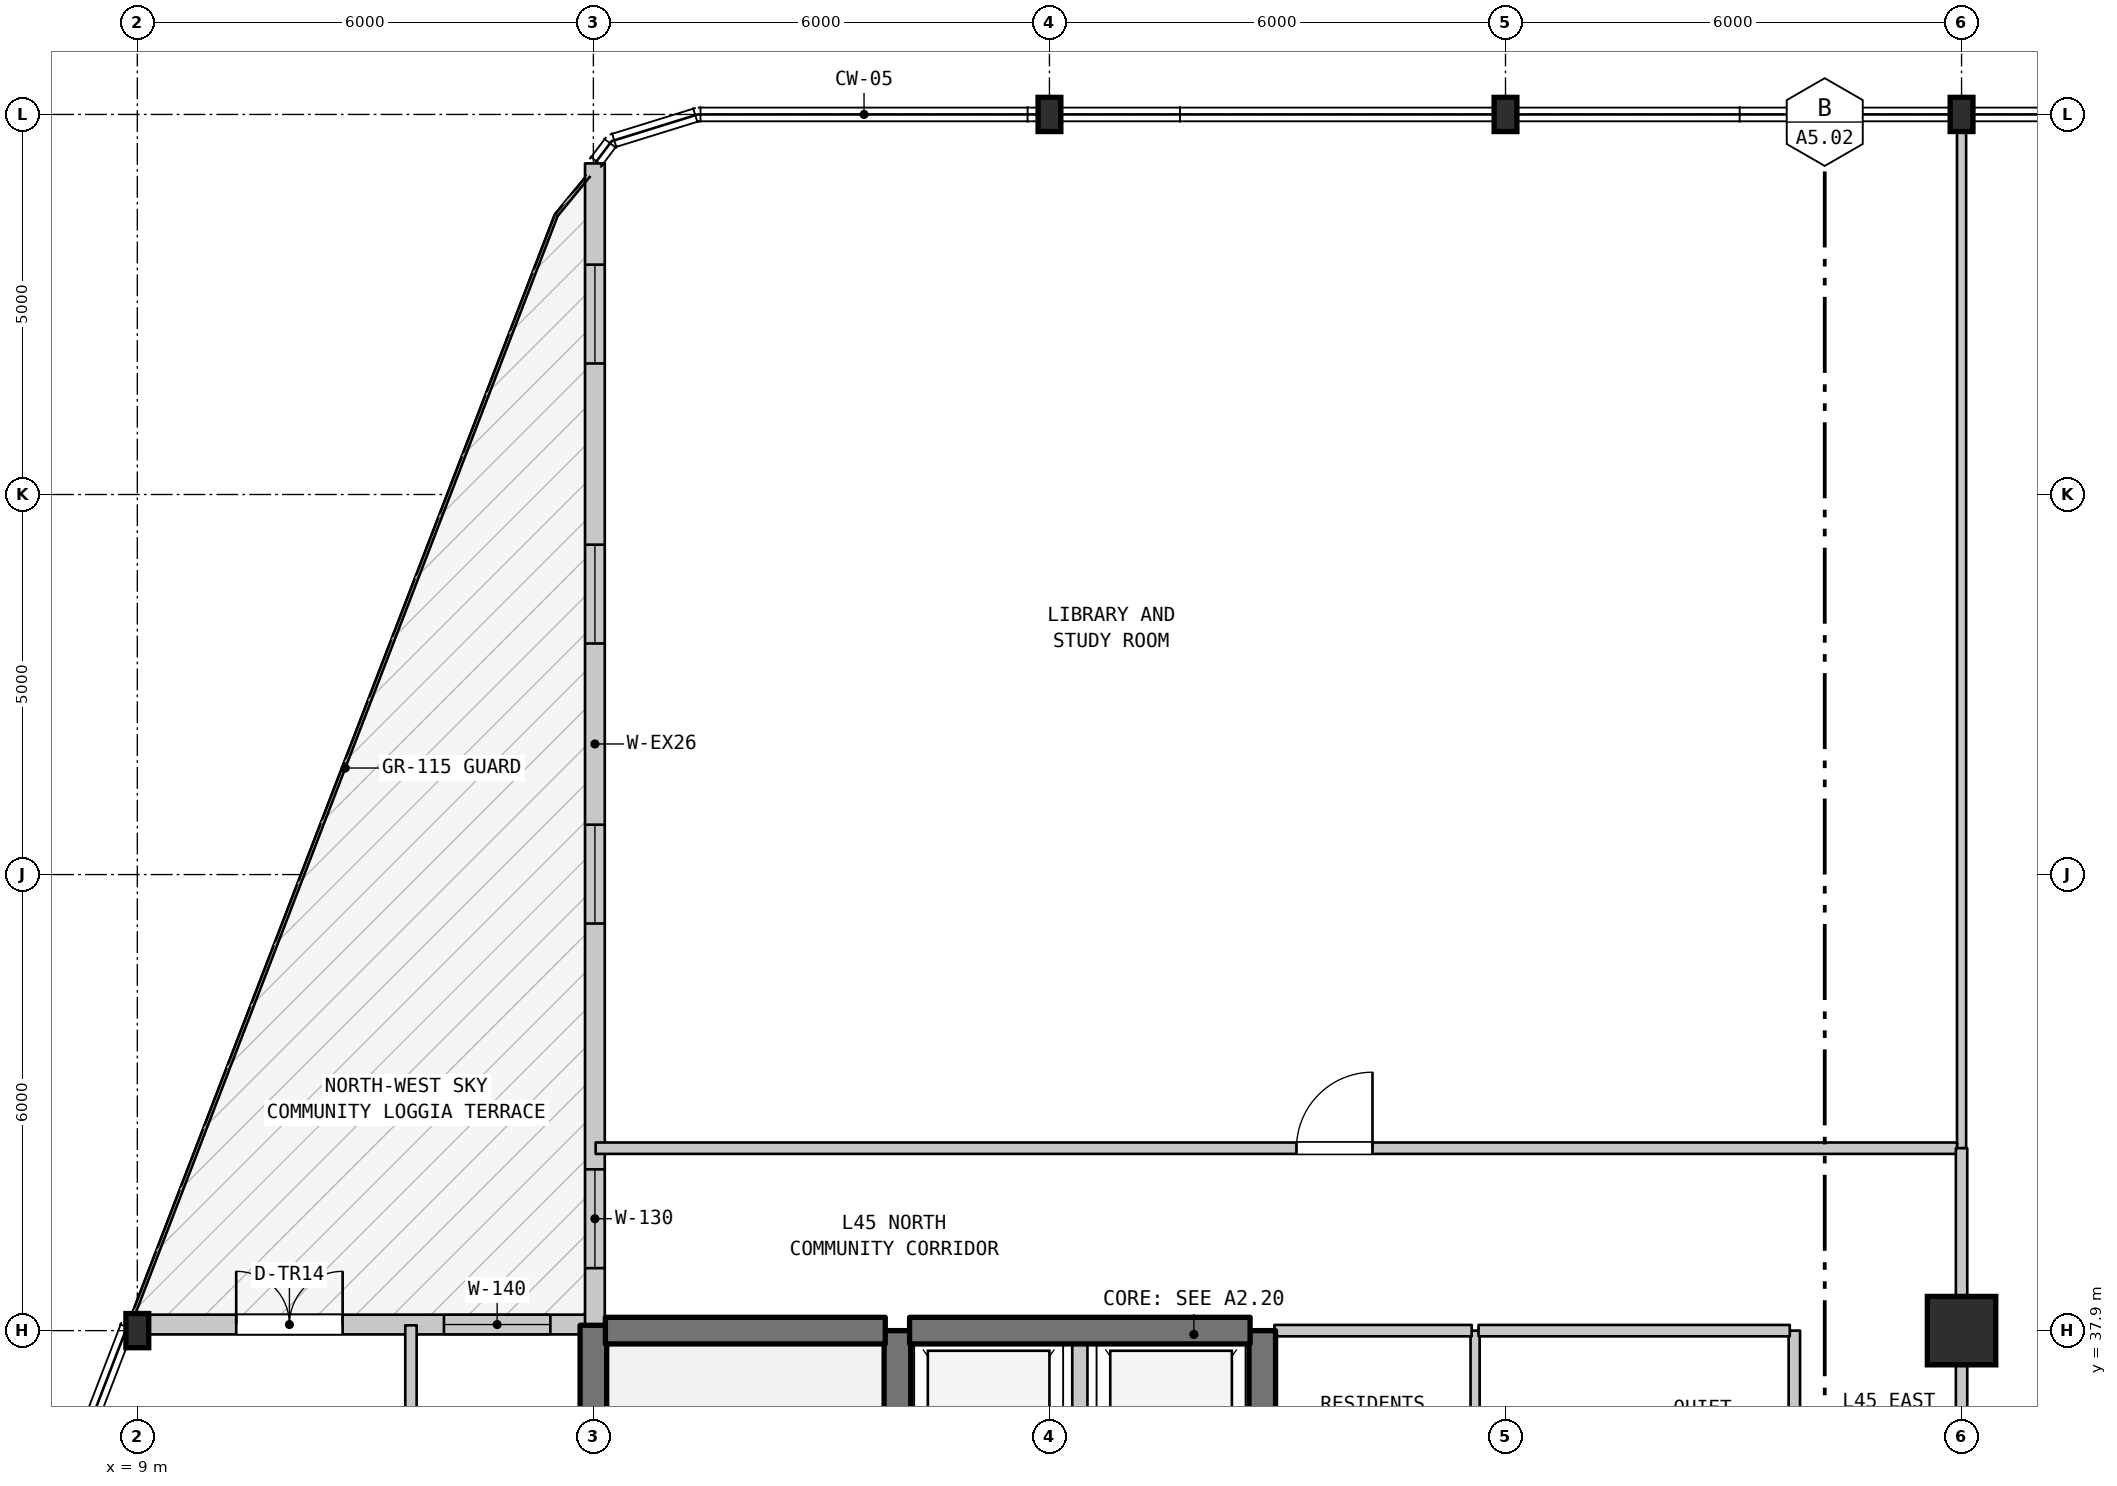
"""IFC4 building model, lengths in metres.
Left out: names, types, materials, properties, quantities, classifications, styles, units other than length and angle.
Written with IfcOpenShell. Run it as: python <this file> out.ifc"""

import sys

from ifc_helpers import new_model, si_unit, direction, frame, frame_2d, origin, origin_2d, place, context, subcontext, project, spatial, rectangle, i_section, extrude, element, fill, save


model = new_model("IFC4")
c1 = context("Model", 3, precision=1e-05, world=origin(), true_north=direction((0.0, 1.0)))
c2 = subcontext(c1, "Body", "Model", "MODEL_VIEW")
j1 = project(units=[si_unit("LENGTHUNIT", "METRE"), si_unit("PLANEANGLEUNIT", "RADIAN")], contexts=[c1])
p1 = place(None, origin())
s1 = spatial("IfcSite", under=j1, at=p1, CompositionType="ELEMENT")
p2 = place(p1, origin())
s2 = spatial("IfcBuilding", under=s1, at=p2, CompositionType="ELEMENT")
p3 = place(p2, frame((0.0, 0.0, 183.9)))
s3 = spatial("IfcBuildingStorey", under=s2, at=p3, CompositionType="ELEMENT", Elevation=183.9)
for number, where, z_axis, x_axis in (
    (1, (9.0, 37.9, 0.0), (0.0, 0.0, 1.0), (1.0, 0.0, 0.0)),
    (2, (21.0, 53.9, 0.0), (0.0, 0.0, 1.0), (1.0, 0.0, 0.0)),
    (3, (27.0, 53.9, 0.0), (0.0, 0.0, 1.0), (1.0, 0.0, 0.0)),
):
    element("IfcColumn", number, at=place(p3, frame(where, z_axis=z_axis, x_axis=x_axis)), inside=s3, PredefinedType="COLUMN", context=c2, shape_type="SweptSolid", body=[
        extrude(i_section(OverallWidth=0.3, OverallDepth=0.45, WebThickness=0.014, FlangeThickness=0.026, FilletRadius=0.027, at=origin_2d()), origin(), (0.0, 0.0, 1.0), 4.5),
    ])
p4 = place(p3, frame((33.0, 37.9, 0.0), z_axis=(0.0, 0.0, 1.0), x_axis=(1.0, 0.0, 0.0)))
e4 = element("IfcColumn", 4, at=p4, inside=s3, PredefinedType="COLUMN", context=c2, shape_type="SweptSolid", body=[
    extrude(rectangle(XDim=0.9, YDim=0.9, at=origin_2d()), origin(), (0.0, 0.0, 1.0), 4.5),
])
p5 = place(p3, frame((33.0, 53.9, 0.0), z_axis=(0.0, 0.0, 1.0), x_axis=(1.0, 0.0, 0.0)))
e5 = element("IfcColumn", 5, at=p5, inside=s3, PredefinedType="COLUMN", context=c2, shape_type="SweptSolid", body=[
    extrude(i_section(OverallWidth=0.3, OverallDepth=0.45, WebThickness=0.014, FlangeThickness=0.026, FilletRadius=0.027, at=origin_2d()), origin(), (0.0, 0.0, 1.0), 4.5),
])
p6 = place(p3, frame((8.877, 37.98, 0.0), z_axis=(0.0, 0.0, 1.0), x_axis=(1.0, 0.0, 0.0)))
e6 = element("IfcWall", 6, at=p6, inside=s3, PredefinedType="STANDARD", context=c2, shape_type="SweptSolid", body=[
    extrude(rectangle(XDim=6.143, YDim=0.26, at=frame_2d((3.072, 0.0))), origin(), (0.0, 0.0, 1.0), 3.89),
])
p7 = place(p6, frame((1.424, 0.0, 0.0)))
e7 = element("IfcOpeningElement", 7, at=p7, cuts=e6, PredefinedType="OPENING", context=c2, shape_type="SweptSolid", body=[
    extrude(rectangle(XDim=1.4, YDim=2.2, at=frame_2d((0.7, 1.1))), frame((0.0, 0.14, 0.0), z_axis=(0.0, -1.0, 0.0), x_axis=(1.0, 0.0, 0.0)), (0.0, 0.0, 1.0), 0.28),
])
p8 = place(p6, frame((4.157, 0.0, 0.9)))
e8 = element("IfcOpeningElement", 8, at=p8, cuts=e6, PredefinedType="OPENING", context=c2, shape_type="SweptSolid", body=[
    extrude(rectangle(XDim=1.4, YDim=1.85, at=frame_2d((0.7, 0.925))), frame((0.0, 0.14, 0.0), z_axis=(0.0, -1.0, 0.0), x_axis=(1.0, 0.0, 0.0)), (0.0, 0.0, 1.0), 0.28),
])
p9 = place(p3, frame((15.02, 37.98, 0.0), z_axis=(0.0, 0.0, 1.0), x_axis=(0.0, 1.0, 0.0)))
e9 = element("IfcWall", 9, at=p9, inside=s3, PredefinedType="STANDARD", context=c2, shape_type="SweptSolid", body=[
    extrude(rectangle(XDim=15.276, YDim=0.26, at=frame_2d((7.638, 0.0))), origin(), (0.0, 0.0, 1.0), 4.19),
])
p10 = place(p9, frame((0.742, 0.0, 0.85)))
e10 = element("IfcOpeningElement", 10, at=p10, cuts=e9, PredefinedType="OPENING", context=c2, shape_type="SweptSolid", body=[
    extrude(rectangle(XDim=1.3, YDim=1.9, at=frame_2d((0.65, 0.95))), frame((0.0, 0.14, 0.0), z_axis=(0.0, -1.0, 0.0), x_axis=(1.0, 0.0, 0.0)), (0.0, 0.0, 1.0), 0.28),
])
p11 = place(p9, frame((5.276, 0.0, 0.85)))
e11 = element("IfcOpeningElement", 11, at=p11, cuts=e9, PredefinedType="OPENING", context=c2, shape_type="SweptSolid", body=[
    extrude(rectangle(XDim=1.3, YDim=1.9, at=frame_2d((0.65, 0.95))), frame((0.0, 0.14, 0.0), z_axis=(0.0, -1.0, 0.0), x_axis=(1.0, 0.0, 0.0)), (0.0, 0.0, 1.0), 0.28),
])
p12 = place(p9, frame((8.96, 0.0, 0.85)))
e12 = element("IfcOpeningElement", 12, at=p12, cuts=e9, PredefinedType="OPENING", context=c2, shape_type="SweptSolid", body=[
    extrude(rectangle(XDim=1.3, YDim=1.9, at=frame_2d((0.65, 0.95))), frame((0.0, 0.14, 0.0), z_axis=(0.0, -1.0, 0.0), x_axis=(1.0, 0.0, 0.0)), (0.0, 0.0, 1.0), 0.28),
])
p13 = place(p9, frame((12.644, 0.0, 0.85)))
e13 = element("IfcOpeningElement", 13, at=p13, cuts=e9, PredefinedType="OPENING", context=c2, shape_type="SweptSolid", body=[
    extrude(rectangle(XDim=1.3, YDim=1.9, at=frame_2d((0.65, 0.95))), frame((0.0, 0.14, 0.0), z_axis=(0.0, -1.0, 0.0), x_axis=(1.0, 0.0, 0.0)), (0.0, 0.0, 1.0), 0.28),
])
p14 = place(p3, frame((12.6, 17.9, 0.0), z_axis=(0.0, 0.0, 1.0), x_axis=(0.0, 1.0, 0.0)))
e14 = element("IfcWall", 14, at=p14, inside=s3, PredefinedType="STANDARD", context=c2, shape_type="SweptSolid", body=[
    extrude(rectangle(XDim=20.07, YDim=0.15, at=frame_2d((10.035, 0.0))), origin(), (0.0, 0.0, 1.0), 4.19),
])
p15 = place(p14, frame((9.1, 0.0, 0.0)))
e15 = element("IfcOpeningElement", 15, at=p15, cuts=e14, PredefinedType="OPENING", context=c2, shape_type="SweptSolid", body=[
    extrude(rectangle(XDim=1.0, YDim=2.15, at=frame_2d((0.5, 1.075))), frame((0.0, 0.085, 0.0), z_axis=(0.0, -1.0, 0.0), x_axis=(1.0, 0.0, 0.0)), (0.0, 0.0, 1.0), 0.17),
])
p16 = place(p3, frame((15.0, 31.1, 0.0), z_axis=(0.0, 0.0, 1.0), x_axis=(0.0, 1.0, 0.0)))
e16 = element("IfcWall", 16, at=p16, inside=s3, PredefinedType="SHEAR", context=c2, shape_type="SweptSolid", body=[
    extrude(rectangle(XDim=6.87, YDim=0.35, at=frame_2d((3.435, 0.0))), origin(), (0.0, 0.0, 1.0), 4.19),
])
p17 = place(p3, frame((19.0, 35.0, 0.0), z_axis=(0.0, 0.0, 1.0), x_axis=(0.0, 1.0, 0.0)))
e17 = element("IfcWall", 17, at=p17, inside=s3, PredefinedType="SHEAR", context=c2, shape_type="SweptSolid", body=[
    extrude(rectangle(XDim=2.9, YDim=0.35, at=frame_2d((1.45, 0.0))), origin(), (0.0, 0.0, 1.0), 4.19),
])
p18 = place(p3, frame((21.4, 35.0, 0.0), z_axis=(0.0, 0.0, 1.0), x_axis=(0.0, 1.0, 0.0)))
e18 = element("IfcWall", 18, at=p18, inside=s3, PredefinedType="STANDARD", context=c2, shape_type="SweptSolid", body=[
    extrude(rectangle(XDim=2.9, YDim=0.2, at=frame_2d((1.45, 0.0))), origin(), (0.0, 0.0, 1.0), 4.19),
])
p19 = place(p3, frame((23.8, 35.0, 0.0), z_axis=(0.0, 0.0, 1.0), x_axis=(0.0, 1.0, 0.0)))
e19 = element("IfcWall", 19, at=p19, inside=s3, PredefinedType="SHEAR", context=c2, shape_type="SweptSolid", body=[
    extrude(rectangle(XDim=2.9, YDim=0.35, at=frame_2d((1.45, 0.0))), origin(), (0.0, 0.0, 1.0), 4.19),
])
p20 = place(p3, frame((26.6, 35.0, 0.0), z_axis=(0.0, 0.0, 1.0), x_axis=(0.0, 1.0, 0.0)))
e20 = element("IfcWall", 20, at=p20, inside=s3, PredefinedType="PARTITIONING", context=c2, shape_type="SweptSolid", body=[
    extrude(rectangle(XDim=2.9, YDim=0.12, at=frame_2d((1.45, 0.0))), origin(), (0.0, 0.0, 1.0), 4.19),
])
p21 = place(p3, frame((30.8, 35.0, 0.0), z_axis=(0.0, 0.0, 1.0), x_axis=(0.0, 1.0, 0.0)))
e21 = element("IfcWall", 21, at=p21, inside=s3, PredefinedType="STANDARD", context=c2, shape_type="SweptSolid", body=[
    extrude(rectangle(XDim=2.9, YDim=0.15, at=frame_2d((1.45, 0.0))), origin(), (0.0, 0.0, 1.0), 4.19),
])
p22 = place(p3, frame((33.0, 27.9, 0.0), z_axis=(0.0, 0.0, 1.0), x_axis=(0.0, 1.0, 0.0)))
e22 = element("IfcWall", 22, at=p22, inside=s3, PredefinedType="STANDARD", context=c2, shape_type="SweptSolid", body=[
    extrude(rectangle(XDim=10.0, YDim=0.15, at=frame_2d((5.0, 0.0))), origin(), (0.0, 0.0, 1.0), 3.69),
])
p23 = place(p3, frame((33.0, 40.3, 0.0), z_axis=(0.0, 0.0, 1.0), x_axis=(0.0, 1.0, 0.0)))
e23 = element("IfcWall", 23, at=p23, inside=s3, PredefinedType="PARTITIONING", context=c2, shape_type="SweptSolid", body=[
    extrude(rectangle(XDim=13.59, YDim=0.12, at=frame_2d((6.795, 0.0))), origin(), (0.0, 0.0, 1.0), 3.59),
])
p24 = place(p3, frame((15.158, 37.9, 0.0), z_axis=(0.0, 0.0, 1.0), x_axis=(1.0, 0.0, 0.0)))
e24 = element("IfcWall", 24, at=p24, inside=s3, PredefinedType="SHEAR", context=c2, shape_type="SweptSolid", body=[
    extrude(rectangle(XDim=3.682, YDim=0.35, at=frame_2d((1.841, 0.0))), origin(), (0.0, 0.0, 1.0), 4.19),
])
p25 = place(p3, frame((19.16, 37.9, 0.0), z_axis=(0.0, 0.0, 1.0), x_axis=(1.0, 0.0, 0.0)))
e25 = element("IfcWall", 25, at=p25, inside=s3, PredefinedType="SHEAR", context=c2, shape_type="SweptSolid", body=[
    extrude(rectangle(XDim=4.48, YDim=0.35, at=frame_2d((2.24, 0.0))), origin(), (0.0, 0.0, 1.0), 4.19),
])
p26 = place(p3, frame((23.96, 37.9, 0.0), z_axis=(0.0, 0.0, 1.0), x_axis=(1.0, 0.0, 0.0)))
e26 = element("IfcWall", 26, at=p26, inside=s3, PredefinedType="STANDARD", context=c2, shape_type="SweptSolid", body=[
    extrude(rectangle(XDim=2.595, YDim=0.15, at=frame_2d((1.297, 0.0))), origin(), (0.0, 0.0, 1.0), 3.69),
])
p27 = place(p3, frame((26.645, 37.9, 0.0), z_axis=(0.0, 0.0, 1.0), x_axis=(1.0, 0.0, 0.0)))
e27 = element("IfcWall", 27, at=p27, inside=s3, PredefinedType="STANDARD", context=c2, shape_type="SweptSolid", body=[
    extrude(rectangle(XDim=4.095, YDim=0.15, at=frame_2d((2.047, 0.0))), origin(), (0.0, 0.0, 1.0), 3.69),
])
p28 = place(p3, frame((15.03, 40.3, 0.0), z_axis=(0.0, 0.0, 1.0), x_axis=(1.0, 0.0, 0.0)))
e28 = element("IfcWall", 28, at=p28, inside=s3, PredefinedType="STANDARD", context=c2, shape_type="SweptSolid", body=[
    extrude(rectangle(XDim=17.91, YDim=0.15, at=frame_2d((8.955, 0.0))), origin(), (0.0, 0.0, 1.0), 4.19),
])
p29 = place(p28, frame((9.22, 0.0, 0.0)))
e29 = element("IfcOpeningElement", 29, at=p29, cuts=e28, PredefinedType="OPENING", context=c2, shape_type="SweptSolid", body=[
    extrude(rectangle(XDim=1.0, YDim=2.15, at=frame_2d((0.5, 1.075))), frame((0.0, 0.085, 0.0), z_axis=(0.0, -1.0, 0.0), x_axis=(1.0, 0.0, 0.0)), (0.0, 0.0, 1.0), 0.17),
])
p30 = place(p3, frame((33.0, 37.9, 0.0), z_axis=(0.0, 0.0, 1.0), x_axis=(0.0, 1.0, 0.0)))
e30 = element("IfcWall", 30, at=p30, inside=s3, PredefinedType="STANDARD", context=c2, shape_type="SweptSolid", body=[
    extrude(rectangle(XDim=2.4, YDim=0.15, at=frame_2d((1.2, 0.0))), origin(), (0.0, 0.0, 1.0), 3.59),
])
p31 = place(p7, origin())
e31 = element("IfcDoor", 31, at=p31, inside=s3, OperationType="DOUBLE_DOOR_SINGLE_SWING", PredefinedType="DOOR", context=c2, shape_type="SweptSolid", body=[
    extrude(rectangle(XDim=1.4, YDim=2.2, at=frame_2d((0.7, 1.1))), frame((0.0, 0.025, 0.0), z_axis=(0.0, -1.0, 0.0), x_axis=(1.0, 0.0, 0.0)), (0.0, 0.0, 1.0), 0.05),
])
fill(e7, e31)
p32 = place(p8, origin())
e32 = element("IfcWindow", 32, at=p32, inside=s3, PartitioningType="SINGLE_PANEL", PredefinedType="WINDOW", context=c2, shape_type="SweptSolid", body=[
    extrude(rectangle(XDim=1.4, YDim=1.85, at=frame_2d((0.7, 0.925))), frame((0.0, 0.03, 0.0), z_axis=(0.0, -1.0, 0.0), x_axis=(1.0, 0.0, 0.0)), (0.0, 0.0, 1.0), 0.06),
])
fill(e8, e32)
p33 = place(p10, origin())
e33 = element("IfcWindow", 33, at=p33, inside=s3, PartitioningType="SINGLE_PANEL", PredefinedType="WINDOW", context=c2, shape_type="SweptSolid", body=[
    extrude(rectangle(XDim=1.3, YDim=1.9, at=frame_2d((0.65, 0.95))), frame((0.0, 0.03, 0.0), z_axis=(0.0, -1.0, 0.0), x_axis=(1.0, 0.0, 0.0)), (0.0, 0.0, 1.0), 0.06),
])
fill(e10, e33)
p34 = place(p11, origin())
e34 = element("IfcWindow", 34, at=p34, inside=s3, PartitioningType="SINGLE_PANEL", PredefinedType="WINDOW", context=c2, shape_type="SweptSolid", body=[
    extrude(rectangle(XDim=1.3, YDim=1.9, at=frame_2d((0.65, 0.95))), frame((0.0, 0.03, 0.0), z_axis=(0.0, -1.0, 0.0), x_axis=(1.0, 0.0, 0.0)), (0.0, 0.0, 1.0), 0.06),
])
fill(e11, e34)
p35 = place(p12, origin())
e35 = element("IfcWindow", 35, at=p35, inside=s3, PartitioningType="SINGLE_PANEL", PredefinedType="WINDOW", context=c2, shape_type="SweptSolid", body=[
    extrude(rectangle(XDim=1.3, YDim=1.9, at=frame_2d((0.65, 0.95))), frame((0.0, 0.03, 0.0), z_axis=(0.0, -1.0, 0.0), x_axis=(1.0, 0.0, 0.0)), (0.0, 0.0, 1.0), 0.06),
])
fill(e12, e35)
p36 = place(p13, origin())
e36 = element("IfcWindow", 36, at=p36, inside=s3, PartitioningType="SINGLE_PANEL", PredefinedType="WINDOW", context=c2, shape_type="SweptSolid", body=[
    extrude(rectangle(XDim=1.3, YDim=1.9, at=frame_2d((0.65, 0.95))), frame((0.0, 0.03, 0.0), z_axis=(0.0, -1.0, 0.0), x_axis=(1.0, 0.0, 0.0)), (0.0, 0.0, 1.0), 0.06),
])
fill(e13, e36)
p37 = place(p29, origin())
e37 = element("IfcDoor", 37, at=p37, inside=s3, OperationType="SINGLE_SWING_RIGHT", PredefinedType="DOOR", context=c2, shape_type="SweptSolid", body=[
    extrude(rectangle(XDim=1.0, YDim=2.15, at=frame_2d((0.5, 1.075))), frame((0.0, 0.025, 0.0), z_axis=(0.0, -1.0, 0.0), x_axis=(1.0, 0.0, 0.0)), (0.0, 0.0, 1.0), 0.05),
])
fill(e29, e37)
save(model, sys.argv[1])
